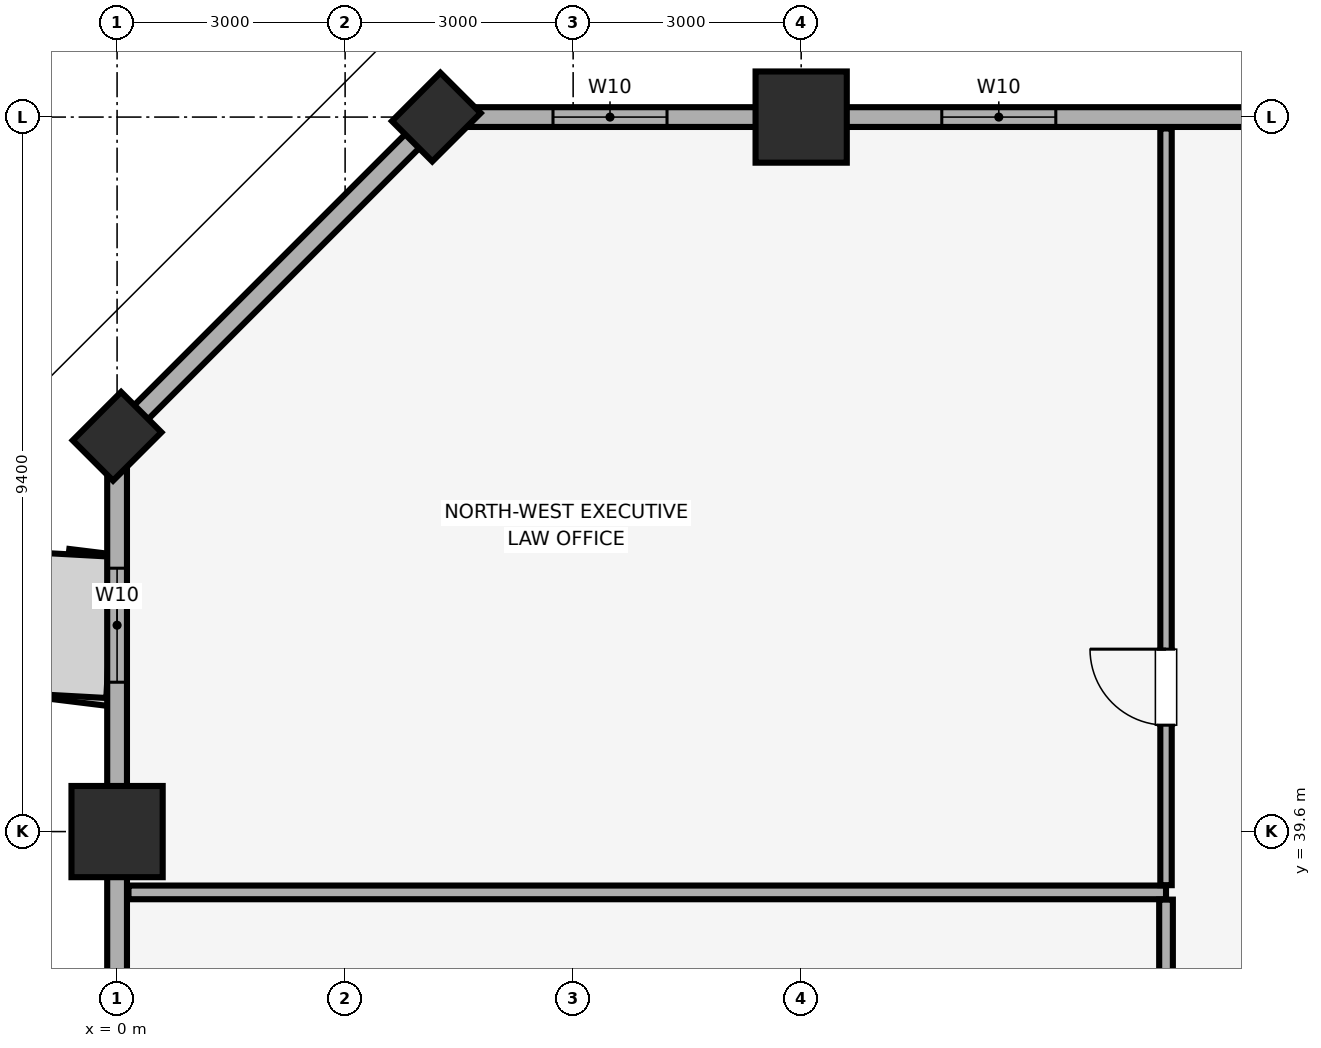
"""IFC4 building model, lengths in metres.
Left out: names, types, materials, properties, quantities, classifications, styles, units other than length and angle.
Written with IfcOpenShell. Run it as: python <this file> out.ifc"""

import sys

from ifc_helpers import new_model, si_unit, direction, frame, frame_2d, origin, origin_2d, place, context, subcontext, project, spatial, rectangle, extrude, element, fill, save


model = new_model("IFC4")
c1 = context("Model", 3, precision=1e-05, world=origin(), true_north=direction((0.0, 1.0)))
c2 = subcontext(c1, "Body", "Model", "MODEL_VIEW")
j1 = project(units=[si_unit("LENGTHUNIT", "METRE"), si_unit("PLANEANGLEUNIT", "RADIAN")], contexts=[c1])
p1 = place(None, origin())
s1 = spatial("IfcSite", under=j1, at=p1, CompositionType="ELEMENT")
p2 = place(p1, origin())
s2 = spatial("IfcBuilding", under=s1, at=p2, CompositionType="ELEMENT")
p3 = place(p2, frame((0.0, 0.0, 104.3)))
s3 = spatial("IfcBuildingStorey", under=s2, at=p3, CompositionType="ELEMENT", Elevation=104.3)
p4 = place(p3, frame((0.0, 39.6, 0.0), z_axis=(0.0, 0.0, 1.0), x_axis=(1.0, 0.0, 0.0)))
e1 = element("IfcColumn", 1, at=p4, inside=s3, PredefinedType="COLUMN", context=c2, shape_type="SweptSolid", body=[
    extrude(rectangle(XDim=1.2, YDim=1.2, at=origin_2d()), origin(), (0.0, 0.0, 1.0), 3.51),
])
for number, where, z_axis, x_axis in (
    (2, (4.2, 49.0, 0.0), (0.0, 0.0, 1.0), (0.707, 0.707, 0.0)),
    (3, (0.0, 44.8, 0.0), (0.0, 0.0, 1.0), (0.707, 0.707, 0.0)),
):
    element("IfcColumn", number, at=place(p3, frame(where, z_axis=z_axis, x_axis=x_axis)), inside=s3, PredefinedType="PILASTER", context=c2, shape_type="SweptSolid", body=[
        extrude(rectangle(XDim=0.9, YDim=0.75, at=origin_2d()), origin(), (0.0, 0.0, 1.0), 3.51),
    ])
p5 = place(p3, frame((9.0, 49.0, 0.0), z_axis=(0.0, 0.0, 1.0), x_axis=(1.0, 0.0, 0.0)))
e4 = element("IfcColumn", 4, at=p5, inside=s3, PredefinedType="COLUMN", context=c2, shape_type="SweptSolid", body=[
    extrude(rectangle(XDim=1.2, YDim=1.2, at=origin_2d()), origin(), (0.0, 0.0, 1.0), 3.51),
])
p6 = place(p3, frame((79.8, 49.0, 0.0), z_axis=(0.0, 0.0, 1.0), x_axis=(-1.0, 0.0, 0.0)))
e5 = element("IfcWall", 5, at=p6, inside=s3, PredefinedType="SOLIDWALL", context=c2, shape_type="SweptSolid", body=[
    extrude(rectangle(XDim=75.6, YDim=0.26, at=frame_2d((37.8, 0.0))), origin(), (0.0, 0.0, 1.0), 2.56),
])
p7 = place(p6, frame((72.565, 0.0, 0.85)))
e6 = element("IfcOpeningElement", 6, at=p7, cuts=e5, PredefinedType="OPENING", context=c2, shape_type="SweptSolid", body=[
    extrude(rectangle(XDim=1.5, YDim=1.4, at=frame_2d((0.75, 0.7))), frame((0.0, 0.14, 0.0), z_axis=(0.0, -1.0, 0.0), x_axis=(1.0, 0.0, 0.0)), (0.0, 0.0, 1.0), 0.28),
])
p8 = place(p6, frame((67.45, 0.0, 0.85)))
e7 = element("IfcOpeningElement", 7, at=p8, cuts=e5, PredefinedType="OPENING", context=c2, shape_type="SweptSolid", body=[
    extrude(rectangle(XDim=1.5, YDim=1.4, at=frame_2d((0.75, 0.7))), frame((0.0, 0.14, 0.0), z_axis=(0.0, -1.0, 0.0), x_axis=(1.0, 0.0, 0.0)), (0.0, 0.0, 1.0), 0.28),
])
p9 = place(p6, frame((6.65, 0.0, 0.85)))
e8 = element("IfcOpeningElement", 8, at=p9, cuts=e5, PredefinedType="OPENING", context=c2, shape_type="SweptSolid", body=[
    extrude(rectangle(XDim=1.5, YDim=1.4, at=frame_2d((0.75, 0.7))), frame((0.0, 0.14, 0.0), z_axis=(0.0, -1.0, 0.0), x_axis=(1.0, 0.0, 0.0)), (0.0, 0.0, 1.0), 0.28),
])
p10 = place(p6, frame((1.535, 0.0, 0.85)))
e9 = element("IfcOpeningElement", 9, at=p10, cuts=e5, PredefinedType="OPENING", context=c2, shape_type="SweptSolid", body=[
    extrude(rectangle(XDim=1.5, YDim=1.4, at=frame_2d((0.75, 0.7))), frame((0.0, 0.14, 0.0), z_axis=(0.0, -1.0, 0.0), x_axis=(1.0, 0.0, 0.0)), (0.0, 0.0, 1.0), 0.28),
])
p11 = place(p6, frame((51.365, 0.0, 0.9)))
e10 = element("IfcOpeningElement", 10, at=p11, cuts=e5, PredefinedType="OPENING", context=c2, shape_type="SweptSolid", body=[
    extrude(rectangle(XDim=1.5, YDim=1.4, at=frame_2d((0.75, 0.7))), frame((0.0, 0.14, 0.0), z_axis=(0.0, -1.0, 0.0), x_axis=(1.0, 0.0, 0.0)), (0.0, 0.0, 1.0), 0.28),
])
p12 = place(p6, frame((46.0, 0.0, 0.9)))
e11 = element("IfcOpeningElement", 11, at=p12, cuts=e5, PredefinedType="OPENING", context=c2, shape_type="SweptSolid", body=[
    extrude(rectangle(XDim=1.5, YDim=1.4, at=frame_2d((0.75, 0.7))), frame((0.0, 0.14, 0.0), z_axis=(0.0, -1.0, 0.0), x_axis=(1.0, 0.0, 0.0)), (0.0, 0.0, 1.0), 0.28),
])
p13 = place(p6, frame((29.15, 0.0, 0.9)))
e12 = element("IfcOpeningElement", 12, at=p13, cuts=e5, PredefinedType="OPENING", context=c2, shape_type="SweptSolid", body=[
    extrude(rectangle(XDim=1.5, YDim=1.4, at=frame_2d((0.75, 0.7))), frame((0.0, 0.14, 0.0), z_axis=(0.0, -1.0, 0.0), x_axis=(1.0, 0.0, 0.0)), (0.0, 0.0, 1.0), 0.28),
])
p14 = place(p6, frame((23.485, 0.0, 0.9)))
e13 = element("IfcOpeningElement", 13, at=p14, cuts=e5, PredefinedType="OPENING", context=c2, shape_type="SweptSolid", body=[
    extrude(rectangle(XDim=1.5, YDim=1.4, at=frame_2d((0.75, 0.7))), frame((0.0, 0.14, 0.0), z_axis=(0.0, -1.0, 0.0), x_axis=(1.0, 0.0, 0.0)), (0.0, 0.0, 1.0), 0.28),
])
p15 = place(p3, frame((4.2, 49.0, 0.0), z_axis=(0.0, 0.0, 1.0), x_axis=(-0.707106781187, -0.707106781187, 0.0)))
e14 = element("IfcWall", 14, at=p15, inside=s3, PredefinedType="SOLIDWALL", context=c2, shape_type="SweptSolid", body=[
    extrude(rectangle(XDim=5.94, YDim=0.26, at=frame_2d((2.97, 0.0))), origin(), (0.0, 0.0, 1.0), 2.56),
])
p16 = place(p3, frame((0.0, 44.8, 0.0), z_axis=(0.0, 0.0, 1.0), x_axis=(0.0, -1.0, 0.0)))
e15 = element("IfcWall", 15, at=p16, inside=s3, PredefinedType="SOLIDWALL", context=c2, shape_type="SweptSolid", body=[
    extrude(rectangle(XDim=40.6, YDim=0.26, at=frame_2d((20.3, 0.0))), origin(), (0.0, 0.0, 1.0), 2.56),
])
p17 = place(p16, frame((33.05, 0.0, 0.85)))
e16 = element("IfcOpeningElement", 16, at=p17, cuts=e15, PredefinedType="OPENING", context=c2, shape_type="SweptSolid", body=[
    extrude(rectangle(XDim=1.5, YDim=1.4, at=frame_2d((0.75, 0.7))), frame((0.0, 0.14, 0.0), z_axis=(0.0, -1.0, 0.0), x_axis=(1.0, 0.0, 0.0)), (0.0, 0.0, 1.0), 0.28),
])
p18 = place(p16, frame((25.35, 0.0, 0.85)))
e17 = element("IfcOpeningElement", 17, at=p18, cuts=e15, PredefinedType="OPENING", context=c2, shape_type="SweptSolid", body=[
    extrude(rectangle(XDim=1.5, YDim=1.4, at=frame_2d((0.75, 0.7))), frame((0.0, 0.14, 0.0), z_axis=(0.0, -1.0, 0.0), x_axis=(1.0, 0.0, 0.0)), (0.0, 0.0, 1.0), 0.28),
])
p19 = place(p16, frame((17.625, 0.0, 0.85)))
e18 = element("IfcOpeningElement", 18, at=p19, cuts=e15, PredefinedType="OPENING", context=c2, shape_type="SweptSolid", body=[
    extrude(rectangle(XDim=1.5, YDim=1.4, at=frame_2d((0.75, 0.7))), frame((0.0, 0.14, 0.0), z_axis=(0.0, -1.0, 0.0), x_axis=(1.0, 0.0, 0.0)), (0.0, 0.0, 1.0), 0.28),
])
p20 = place(p16, frame((9.75, 0.0, 0.85)))
e19 = element("IfcOpeningElement", 19, at=p20, cuts=e15, PredefinedType="OPENING", context=c2, shape_type="SweptSolid", body=[
    extrude(rectangle(XDim=1.5, YDim=1.4, at=frame_2d((0.75, 0.7))), frame((0.0, 0.14, 0.0), z_axis=(0.0, -1.0, 0.0), x_axis=(1.0, 0.0, 0.0)), (0.0, 0.0, 1.0), 0.28),
])
p21 = place(p16, frame((1.735, 0.0, 0.85)))
e20 = element("IfcOpeningElement", 20, at=p21, cuts=e15, PredefinedType="OPENING", context=c2, shape_type="SweptSolid", body=[
    extrude(rectangle(XDim=1.5, YDim=1.4, at=frame_2d((0.75, 0.7))), frame((0.0, 0.14, 0.0), z_axis=(0.0, -1.0, 0.0), x_axis=(1.0, 0.0, 0.0)), (0.0, 0.0, 1.0), 0.28),
])
p22 = place(p3, frame((0.15, 38.8, 0.0), z_axis=(0.0, 0.0, 1.0), x_axis=(1.0, 0.0, 0.0)))
e21 = element("IfcWall", 21, at=p22, inside=s3, PredefinedType="PARTITIONING", context=c2, shape_type="SweptSolid", body=[
    extrude(rectangle(XDim=13.65, YDim=0.18, at=frame_2d((6.825, 0.0))), origin(), (0.0, 0.0, 1.0), 3.51),
])
p23 = place(p3, frame((13.8, 29.495, 0.0), z_axis=(0.0, 0.0, 1.0), x_axis=(0.0, 1.0, 0.0)))
e22 = element("IfcWall", 22, at=p23, inside=s3, PredefinedType="PARTITIONING", context=c2, shape_type="SweptSolid", body=[
    extrude(rectangle(XDim=9.21, YDim=0.18, at=frame_2d((4.605, 0.0))), origin(), (0.0, 0.0, 1.0), 3.51),
])
p24 = place(p23, frame((5.775, 0.0, 0.0)))
e23 = element("IfcOpeningElement", 23, at=p24, cuts=e22, PredefinedType="OPENING", context=c2, shape_type="SweptSolid", body=[
    extrude(rectangle(XDim=1.0, YDim=2.15, at=frame_2d((0.5, 1.075))), frame((0.0, 0.1, 0.0), z_axis=(0.0, -1.0, 0.0), x_axis=(1.0, 0.0, 0.0)), (0.0, 0.0, 1.0), 0.2),
])
p25 = place(p3, frame((13.8, 38.895, 0.0), z_axis=(0.0, 0.0, 1.0), x_axis=(0.0, 1.0, 0.0)))
e24 = element("IfcWall", 24, at=p25, inside=s3, PredefinedType="PARTITIONING", context=c2, shape_type="SweptSolid", body=[
    extrude(rectangle(XDim=9.955, YDim=0.15, at=frame_2d((4.978, 0.0))), origin(), (0.0, 0.0, 1.0), 3.51),
])
p26 = place(p25, frame((2.105, 0.0, 0.0)))
e25 = element("IfcOpeningElement", 25, at=p26, cuts=e24, PredefinedType="OPENING", context=c2, shape_type="SweptSolid", body=[
    extrude(rectangle(XDim=1.0, YDim=2.15, at=frame_2d((0.5, 1.075))), frame((0.0, 0.085, 0.0), z_axis=(0.0, -1.0, 0.0), x_axis=(1.0, 0.0, 0.0)), (0.0, 0.0, 1.0), 0.17),
])
p27 = place(p21, origin())
e26 = element("IfcWindow", 26, at=p27, inside=s3, PartitioningType="SINGLE_PANEL", PredefinedType="WINDOW", context=c2, shape_type="SweptSolid", body=[
    extrude(rectangle(XDim=1.5, YDim=1.4, at=frame_2d((0.75, 0.7))), frame((0.0, 0.03, 0.0), z_axis=(0.0, -1.0, 0.0), x_axis=(1.0, 0.0, 0.0)), (0.0, 0.0, 1.0), 0.06),
])
fill(e20, e26)
p28 = place(p7, origin())
e27 = element("IfcWindow", 27, at=p28, inside=s3, PartitioningType="SINGLE_PANEL", PredefinedType="WINDOW", context=c2, shape_type="SweptSolid", body=[
    extrude(rectangle(XDim=1.5, YDim=1.4, at=frame_2d((0.75, 0.7))), frame((0.0, 0.03, 0.0), z_axis=(0.0, -1.0, 0.0), x_axis=(1.0, 0.0, 0.0)), (0.0, 0.0, 1.0), 0.06),
])
fill(e6, e27)
p29 = place(p8, origin())
e28 = element("IfcWindow", 28, at=p29, inside=s3, PartitioningType="SINGLE_PANEL", PredefinedType="WINDOW", context=c2, shape_type="SweptSolid", body=[
    extrude(rectangle(XDim=1.5, YDim=1.4, at=frame_2d((0.75, 0.7))), frame((0.0, 0.03, 0.0), z_axis=(0.0, -1.0, 0.0), x_axis=(1.0, 0.0, 0.0)), (0.0, 0.0, 1.0), 0.06),
])
fill(e7, e28)
p30 = place(p26, origin())
e29 = element("IfcDoor", 29, at=p30, inside=s3, OperationType="SINGLE_SWING_RIGHT", PredefinedType="DOOR", context=c2, shape_type="SweptSolid", body=[
    extrude(rectangle(XDim=1.0, YDim=2.15, at=frame_2d((0.5, 1.075))), frame((0.0, 0.025, 0.0), z_axis=(0.0, -1.0, 0.0), x_axis=(1.0, 0.0, 0.0)), (0.0, 0.0, 1.0), 0.05),
])
fill(e25, e29)
save(model, sys.argv[1])
